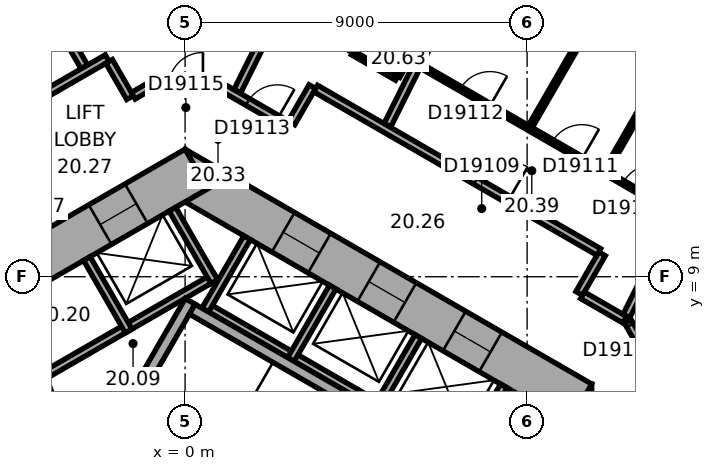
"""IFC4 building model, lengths in metres.
Left out: names, types, materials, properties, quantities, classifications, styles, units other than length and angle.
Written with IfcOpenShell. Run it as: python <this file> out.ifc"""

import sys

from ifc_helpers import new_model, si_unit, direction, frame, frame_2d, origin, place, context, subcontext, project, spatial, rectangle, extrude, element, fill, save


model = new_model("IFC4")
c1 = context("Model", 3, precision=1e-05, world=origin(), true_north=direction((0.0, 1.0)))
c2 = subcontext(c1, "Body", "Model", "MODEL_VIEW")
j1 = project(units=[si_unit("LENGTHUNIT", "METRE"), si_unit("PLANEANGLEUNIT", "RADIAN")], contexts=[c1])
p1 = place(None, origin())
s1 = spatial("IfcSite", under=j1, at=p1, CompositionType="ELEMENT")
p2 = place(p1, origin())
s2 = spatial("IfcBuilding", under=s1, at=p2, CompositionType="ELEMENT")
p3 = place(p2, frame((0.0, 0.0, 90.2)))
s3 = spatial("IfcBuildingStorey", under=s2, at=p3, CompositionType="ELEMENT", Elevation=90.2)
p4 = place(p3, frame((10.1, -6.177, 0.0), z_axis=(0.0, 0.0, 1.0), x_axis=(0.0, 1.0, 0.0)))
e1 = element("IfcWall", 1, at=p4, inside=s3, PredefinedType="SHEAR", context=c2, shape_type="SweptSolid", body=[
    extrude(rectangle(XDim=12.355, YDim=1.2, at=frame_2d((6.177, 0.0))), origin(), (0.0, 0.0, 1.0), 3.3),
])
p5 = place(p4, frame((6.378, 0.0, 0.0)))
e2 = element("IfcOpeningElement", 2, at=p5, cuts=e1, PredefinedType="OPENING", context=c2, shape_type="SweptSolid", body=[
    extrude(rectangle(XDim=1.5, YDim=2.1, at=frame_2d((0.75, 1.05))), frame((0.0, 0.61, 0.0), z_axis=(0.0, -1.0, 0.0), x_axis=(1.0, 0.0, 0.0)), (0.0, 0.0, 1.0), 1.22),
])
p6 = place(p4, frame((1.828, 0.0, 0.0)))
e3 = element("IfcOpeningElement", 3, at=p6, cuts=e1, PredefinedType="OPENING", context=c2, shape_type="SweptSolid", body=[
    extrude(rectangle(XDim=1.1, YDim=2.1, at=frame_2d((0.55, 1.05))), frame((0.0, 0.61, 0.0), z_axis=(0.0, -1.0, 0.0), x_axis=(1.0, 0.0, 0.0)), (0.0, 0.0, 1.0), 1.22),
])
p7 = place(p4, frame((4.427, 0.0, 0.0)))
e4 = element("IfcOpeningElement", 4, at=p7, cuts=e1, PredefinedType="OPENING", context=c2, shape_type="SweptSolid", body=[
    extrude(rectangle(XDim=1.1, YDim=2.1, at=frame_2d((0.55, 1.05))), frame((0.0, 0.61, 0.0), z_axis=(0.0, -1.0, 0.0), x_axis=(1.0, 0.0, 0.0)), (0.0, 0.0, 1.0), 1.22),
])
p8 = place(p3, frame((10.4, 5.658, 0.0), z_axis=(0.0, 0.0, 1.0), x_axis=(-0.866021384402, 0.500006961711, 0.0)))
e5 = element("IfcWall", 5, at=p8, inside=s3, PredefinedType="SHEAR", context=c2, shape_type="SweptSolid", body=[
    extrude(rectangle(XDim=12.355, YDim=1.2, at=frame_2d((6.178, 0.0))), origin(), (0.0, 0.0, 1.0), 3.3),
])
p9 = place(p8, frame((2.728, 0.0, 0.0)))
e6 = element("IfcOpeningElement", 6, at=p9, cuts=e5, PredefinedType="OPENING", context=c2, shape_type="SweptSolid", body=[
    extrude(rectangle(XDim=1.1, YDim=2.1, at=frame_2d((0.55, 1.05))), frame((0.0, 0.61, 0.0), z_axis=(0.0, -1.0, 0.0), x_axis=(1.0, 0.0, 0.0)), (0.0, 0.0, 1.0), 1.22),
])
p10 = place(p8, frame((5.328, 0.0, 0.0)))
e7 = element("IfcOpeningElement", 7, at=p10, cuts=e5, PredefinedType="OPENING", context=c2, shape_type="SweptSolid", body=[
    extrude(rectangle(XDim=1.1, YDim=2.1, at=frame_2d((0.55, 1.05))), frame((0.0, 0.61, 0.0), z_axis=(0.0, -1.0, 0.0), x_axis=(1.0, 0.0, 0.0)), (0.0, 0.0, 1.0), 1.22),
])
p11 = place(p8, frame((7.928, 0.0, 0.0)))
e8 = element("IfcOpeningElement", 8, at=p11, cuts=e5, PredefinedType="OPENING", context=c2, shape_type="SweptSolid", body=[
    extrude(rectangle(XDim=1.1, YDim=2.1, at=frame_2d((0.55, 1.05))), frame((0.0, 0.61, 0.0), z_axis=(0.0, -1.0, 0.0), x_axis=(1.0, 0.0, 0.0)), (0.0, 0.0, 1.0), 1.22),
])
p12 = place(p3, frame((0.3, 11.836, 0.0), z_axis=(0.0, 0.0, 1.0), x_axis=(-0.866021384402, -0.500006961711, 0.0)))
e9 = element("IfcWall", 9, at=p12, inside=s3, PredefinedType="SHEAR", context=c2, shape_type="SweptSolid", body=[
    extrude(rectangle(XDim=12.355, YDim=1.2, at=frame_2d((6.178, 0.0))), origin(), (0.0, 0.0, 1.0), 3.3),
])
p13 = place(p12, frame((6.378, 0.0, 0.0)))
e10 = element("IfcOpeningElement", 10, at=p13, cuts=e9, PredefinedType="OPENING", context=c2, shape_type="SweptSolid", body=[
    extrude(rectangle(XDim=1.5, YDim=2.1, at=frame_2d((0.75, 1.05))), frame((0.0, 0.61, 0.0), z_axis=(0.0, -1.0, 0.0), x_axis=(1.0, 0.0, 0.0)), (0.0, 0.0, 1.0), 1.22),
])
p14 = place(p12, frame((1.828, 0.0, 0.0)))
e11 = element("IfcOpeningElement", 11, at=p14, cuts=e9, PredefinedType="OPENING", context=c2, shape_type="SweptSolid", body=[
    extrude(rectangle(XDim=1.1, YDim=2.1, at=frame_2d((0.55, 1.05))), frame((0.0, 0.61, 0.0), z_axis=(0.0, -1.0, 0.0), x_axis=(1.0, 0.0, 0.0)), (0.0, 0.0, 1.0), 1.22),
])
p15 = place(p3, frame((-3.136, 24.805, 0.0), z_axis=(0.0, 0.0, 1.0), x_axis=(-0.866028291626, -0.499994998079, 0.0)))
e12 = element("IfcWall", 12, at=p15, inside=s3, PredefinedType="STANDARD", context=c2, shape_type="SweptSolid", body=[
    extrude(rectangle(XDim=21.246, YDim=0.2, at=frame_2d((10.623, 0.0))), origin(), (0.0, 0.0, 1.0), 3.3),
])
p16 = place(p15, frame((1.555, 0.0, 0.8)))
e13 = element("IfcOpeningElement", 13, at=p16, cuts=e12, PredefinedType="OPENING", context=c2, shape_type="SweptSolid", body=[
    extrude(rectangle(XDim=2.4, YDim=1.7, at=frame_2d((1.2, 0.85))), frame((0.0, 0.11, 0.0), z_axis=(0.0, -1.0, 0.0), x_axis=(1.0, 0.0, 0.0)), (0.0, 0.0, 1.0), 0.22),
])
p17 = place(p15, frame((5.489, 0.0, 0.8)))
e14 = element("IfcOpeningElement", 14, at=p17, cuts=e12, PredefinedType="OPENING", context=c2, shape_type="SweptSolid", body=[
    extrude(rectangle(XDim=2.4, YDim=1.7, at=frame_2d((1.2, 0.85))), frame((0.0, 0.11, 0.0), z_axis=(0.0, -1.0, 0.0), x_axis=(1.0, 0.0, 0.0)), (0.0, 0.0, 1.0), 0.22),
])
p18 = place(p15, frame((9.424, 0.0, 0.8)))
e15 = element("IfcOpeningElement", 15, at=p18, cuts=e12, PredefinedType="OPENING", context=c2, shape_type="SweptSolid", body=[
    extrude(rectangle(XDim=2.4, YDim=1.7, at=frame_2d((1.2, 0.85))), frame((0.0, 0.11, 0.0), z_axis=(0.0, -1.0, 0.0), x_axis=(1.0, 0.0, 0.0)), (0.0, 0.0, 1.0), 0.22),
])
p19 = place(p15, frame((13.358, 0.0, 0.8)))
e16 = element("IfcOpeningElement", 16, at=p19, cuts=e12, PredefinedType="OPENING", context=c2, shape_type="SweptSolid", body=[
    extrude(rectangle(XDim=2.4, YDim=1.7, at=frame_2d((1.2, 0.85))), frame((0.0, 0.11, 0.0), z_axis=(0.0, -1.0, 0.0), x_axis=(1.0, 0.0, 0.0)), (0.0, 0.0, 1.0), 0.22),
])
p20 = place(p15, frame((17.293, 0.0, 0.8)))
e17 = element("IfcOpeningElement", 17, at=p20, cuts=e12, PredefinedType="OPENING", context=c2, shape_type="SweptSolid", body=[
    extrude(rectangle(XDim=2.4, YDim=1.7, at=frame_2d((1.2, 0.85))), frame((0.0, 0.11, 0.0), z_axis=(0.0, -1.0, 0.0), x_axis=(1.0, 0.0, 0.0)), (0.0, 0.0, 1.0), 0.22),
])
p21 = place(p3, frame((7.424, 4.259, 0.0), z_axis=(0.0, 0.0, 1.0), x_axis=(-0.866026010844, 0.49999894854, 0.0)))
e18 = element("IfcWall", 18, at=p21, inside=s3, PredefinedType="PARTITIONING", context=c2, shape_type="SweptSolid", body=[
    extrude(rectangle(XDim=8.0, YDim=0.2, at=frame_2d((4.0, 0.0))), origin(), (0.0, 0.0, 1.0), 3.05),
])
for number, where, z_axis, x_axis in (
    (19, (7.287, 4.222, 0.0), (0.0, 0.0, 1.0), (0.5, 0.866, 0.0)),
    (20, (5.036, 5.522, 0.0), (0.0, 0.0, 1.0), (0.5, 0.866, 0.0)),
    (21, (2.784, 6.822, 0.0), (0.0, 0.0, 1.0), (0.5, 0.866, 0.0)),
    (22, (0.532, 8.122, 0.0), (0.0, 0.0, 1.0), (0.5, 0.866, 0.0)),
):
    element("IfcWall", number, at=place(p3, frame(where, z_axis=z_axis, x_axis=x_axis)), inside=s3, PredefinedType="PARTITIONING", context=c2, shape_type="SweptSolid", body=[
        extrude(rectangle(XDim=2.2, YDim=0.2, at=frame_2d((1.1, 0.0))), origin(), (0.0, 0.0, 1.0), 3.05),
    ])
p22 = place(p3, frame((0.803, 9.009, 0.0), z_axis=(0.0, 0.0, 1.0), x_axis=(-0.866028230842, -0.499995103361, 0.0)))
e23 = element("IfcWall", 23, at=p22, inside=s3, PredefinedType="PARTITIONING", context=c2, shape_type="SweptSolid", body=[
    extrude(rectangle(XDim=5.4, YDim=0.2, at=frame_2d((2.7, 0.0))), origin(), (0.0, 0.0, 1.0), 3.05),
])
p23 = place(p3, frame((0.767, 8.872, 0.0), z_axis=(0.0, 0.0, 1.0), x_axis=(-0.499994660107, 0.866028486751, 0.0)))
e24 = element("IfcWall", 24, at=p23, inside=s3, PredefinedType="PARTITIONING", context=c2, shape_type="SweptSolid", body=[
    extrude(rectangle(XDim=2.2, YDim=0.2, at=frame_2d((1.1, 0.0))), origin(), (0.0, 0.0, 1.0), 3.05),
])
p24 = place(p3, frame((-1.485, 7.572, 0.0), z_axis=(0.0, 0.0, 1.0), x_axis=(-0.50002983664, 0.866008176907, 0.0)))
e25 = element("IfcWall", 25, at=p24, inside=s3, PredefinedType="PARTITIONING", context=c2, shape_type="SweptSolid", body=[
    extrude(rectangle(XDim=2.2, YDim=0.2, at=frame_2d((1.1, 0.0))), origin(), (0.0, 0.0, 1.0), 3.05),
])
p25 = place(p3, frame((-2.216, 4.282, 0.0), z_axis=(0.0, 0.0, 1.0), x_axis=(0.499977259774, 0.866038532462, 0.0)))
e26 = element("IfcWall", 26, at=p25, inside=s3, PredefinedType="SHEAR", context=c2, shape_type="SweptSolid", body=[
    extrude(rectangle(XDim=4.7, YDim=0.3, at=frame_2d((2.35, 0.0))), origin(), (0.0, 0.0, 1.0), 3.05),
])
p26 = place(p3, frame((6.303, 4.617, 0.0), z_axis=(0.0, 0.0, 1.0), x_axis=(-0.866027801685, 0.499995846692, 0.0)))
e27 = element("IfcWall", 27, at=p26, inside=s3, PredefinedType="SHEAR", context=c2, shape_type="SweptSolid", body=[
    extrude(rectangle(XDim=7.06, YDim=0.3, at=frame_2d((3.53, 0.0))), origin(), (0.0, 0.0, 1.0), 3.05),
])
p27 = place(p3, frame((-2.615, 3.487, 0.0), z_axis=(0.0, 0.0, 1.0), x_axis=(-0.373576831041, 0.92759924068, 0.0)))
e28 = element("IfcWall", 28, at=p27, inside=s3, PredefinedType="PARTITIONING", context=c2, shape_type="SweptSolid", body=[
    extrude(rectangle(XDim=3.002, YDim=0.2, at=frame_2d((1.501, 0.0))), origin(), (0.0, 0.0, 1.0), 3.05),
])
p28 = place(p27, frame((1.15, 0.0, 0.0)))
e29 = element("IfcOpeningElement", 29, at=p28, cuts=e28, PredefinedType="OPENING", context=c2, shape_type="SweptSolid", body=[
    extrude(rectangle(XDim=0.9, YDim=2.1, at=frame_2d((0.45, 1.05))), frame((0.0, 0.11, 0.0), z_axis=(0.0, -1.0, 0.0), x_axis=(1.0, 0.0, 0.0)), (0.0, 0.0, 1.0), 0.22),
])
p29 = place(p3, frame((-6.676, 21.492, 0.0), z_axis=(0.0, 0.0, 1.0), x_axis=(0.500011263043, -0.866018900966, 0.0)))
e30 = element("IfcWall", 30, at=p29, inside=s3, PredefinedType="PARTITIONING", context=c2, shape_type="SweptSolid", body=[
    extrude(rectangle(XDim=8.049, YDim=0.2, at=frame_2d((4.024, 0.0))), origin(), (0.0, 0.0, 1.0), 3.05),
])
p30 = place(p3, frame((-2.05, 14.752, 0.0), z_axis=(0.0, 0.0, 1.0), x_axis=(-0.866030936828, -0.499990416364, 0.0)))
e31 = element("IfcWall", 31, at=p30, inside=s3, PredefinedType="PARTITIONING", context=c2, shape_type="SweptSolid", body=[
    extrude(rectangle(XDim=3.102, YDim=0.2, at=frame_2d((1.551, 0.0))), origin(), (0.0, 0.0, 1.0), 3.05),
])
p31 = place(p3, frame((-1.449, 13.712, 0.0), z_axis=(0.0, 0.0, 1.0), x_axis=(-0.499978356969, 0.866037899034, 0.0)))
e32 = element("IfcWall", 32, at=p31, inside=s3, PredefinedType="PARTITIONING", context=c2, shape_type="SweptSolid", body=[
    extrude(rectangle(XDim=1.101, YDim=0.2, at=frame_2d((0.551, 0.0))), origin(), (0.0, 0.0, 1.0), 3.05),
])
p32 = place(p3, frame((-0.95, 14.001, 0.0), z_axis=(0.0, 0.0, 1.0), x_axis=(-0.86609177584, -0.499885022602, 0.0)))
e33 = element("IfcWall", 33, at=p32, inside=s3, PredefinedType="PARTITIONING", context=c2, shape_type="SweptSolid", body=[
    extrude(rectangle(XDim=0.477, YDim=0.2, at=frame_2d((0.238, 0.0))), origin(), (0.0, 0.0, 1.0), 3.05),
])
p33 = place(p3, frame((0.95, 14.001, 0.0), z_axis=(0.0, 0.0, 1.0), x_axis=(-1.0, 0.0, 0.0)))
e34 = element("IfcWall", 34, at=p33, inside=s3, PredefinedType="PARTITIONING", context=c2, shape_type="SweptSolid", body=[
    extrude(rectangle(XDim=1.86, YDim=0.2, at=frame_2d((0.93, 0.0))), origin(), (0.0, 0.0, 1.0), 3.05),
])
p34 = place(p33, frame((0.48, 0.0, 0.0)))
e35 = element("IfcOpeningElement", 35, at=p34, cuts=e34, PredefinedType="OPENING", context=c2, shape_type="SweptSolid", body=[
    extrude(rectangle(XDim=0.9, YDim=2.1, at=frame_2d((0.45, 1.05))), frame((0.0, 0.11, 0.0), z_axis=(0.0, -1.0, 0.0), x_axis=(1.0, 0.0, 0.0)), (0.0, 0.0, 1.0), 0.22),
])
p35 = place(p3, frame((2.748, 12.962, 0.0), z_axis=(0.0, 0.0, 1.0), x_axis=(-0.866013897511, 0.50001992892, 0.0)))
e36 = element("IfcWall", 36, at=p35, inside=s3, PredefinedType="PARTITIONING", context=c2, shape_type="SweptSolid", body=[
    extrude(rectangle(XDim=2.037, YDim=0.2, at=frame_2d((1.018, 0.0))), origin(), (0.0, 0.0, 1.0), 3.05),
])
p36 = place(p35, frame((0.372, 0.0, 0.0)))
e37 = element("IfcOpeningElement", 37, at=p36, cuts=e36, PredefinedType="OPENING", context=c2, shape_type="SweptSolid", body=[
    extrude(rectangle(XDim=0.9, YDim=2.1, at=frame_2d((0.45, 1.05))), frame((0.0, 0.11, 0.0), z_axis=(0.0, -1.0, 0.0), x_axis=(1.0, 0.0, 0.0)), (0.0, 0.0, 1.0), 0.22),
])
p37 = place(p3, frame((3.349, 14.002, 0.0), z_axis=(0.0, 0.0, 1.0), x_axis=(-0.500074377092, -0.865982457891, 0.0)))
e38 = element("IfcWall", 38, at=p37, inside=s3, PredefinedType="PARTITIONING", context=c2, shape_type="SweptSolid", body=[
    extrude(rectangle(XDim=1.101, YDim=0.2, at=frame_2d((0.55, 0.0))), origin(), (0.0, 0.0, 1.0), 3.05),
])
p38 = place(p3, frame((4.356, 14.922, 0.0), z_axis=(0.0, 0.0, 1.0), x_axis=(0.499936506574, 0.866062058628, 0.0)))
e39 = element("IfcWall", 39, at=p38, inside=s3, PredefinedType="PARTITIONING", context=c2, shape_type="SweptSolid", body=[
    extrude(rectangle(XDim=2.6, YDim=0.12, at=frame_2d((1.3, 0.0))), origin(), (0.0, 0.0, 1.0), 3.05),
])
p39 = place(p38, frame((0.85, 0.0, 0.0)))
e40 = element("IfcOpeningElement", 40, at=p39, cuts=e39, PredefinedType="OPENING", context=c2, shape_type="SweptSolid", body=[
    extrude(rectangle(XDim=0.9, YDim=2.1, at=frame_2d((0.45, 1.05))), frame((0.0, 0.07, 0.0), z_axis=(0.0, -1.0, 0.0), x_axis=(1.0, 0.0, 0.0)), (0.0, 0.0, 1.0), 0.14),
])
p40 = place(p3, frame((5.351, 21.859, 0.0), z_axis=(0.0, 0.0, 1.0), x_axis=(-0.446205309328, -0.894930624086, 0.0)))
e41 = element("IfcWall", 41, at=p40, inside=s3, PredefinedType="PARTITIONING", context=c2, shape_type="SweptSolid", body=[
    extrude(rectangle(XDim=8.913, YDim=0.2, at=frame_2d((4.457, 0.0))), origin(), (0.0, 0.0, 1.0), 2.6),
])
p41 = place(p3, frame((5.569, 14.222, 0.0), z_axis=(0.0, 0.0, 1.0), x_axis=(-0.866036909293, 0.499980071345, 0.0)))
e42 = element("IfcWall", 42, at=p41, inside=s3, PredefinedType="PARTITIONING", context=c2, shape_type="SweptSolid", body=[
    extrude(rectangle(XDim=1.34, YDim=0.12, at=frame_2d((0.67, 0.0))), origin(), (0.0, 0.0, 1.0), 3.05),
])
p42 = place(p3, frame((6.839, 16.422, 0.0), z_axis=(0.0, 0.0, 1.0), x_axis=(-0.50000366821, -0.866023285932, 0.0)))
e43 = element("IfcWall", 43, at=p42, inside=s3, PredefinedType="PARTITIONING", context=c2, shape_type="SweptSolid", body=[
    extrude(rectangle(XDim=2.48, YDim=0.12, at=frame_2d((1.24, 0.0))), origin(), (0.0, 0.0, 1.0), 3.05),
])
p43 = place(p3, frame((8.872, 20.104, 0.0), z_axis=(0.0, 0.0, 1.0), x_axis=(-0.446218378653, -0.894924107706, 0.0)))
e44 = element("IfcWall", 44, at=p43, inside=s3, PredefinedType="PARTITIONING", context=c2, shape_type="SweptSolid", body=[
    extrude(rectangle(XDim=7.95, YDim=0.2, at=frame_2d((3.975, 0.0))), origin(), (0.0, 0.0, 1.0), 3.05),
])
p44 = place(p3, frame((10.371, 8.561, 0.0), z_axis=(0.0, 0.0, 1.0), x_axis=(0.499986357472, 0.866033280158, 0.0)))
e45 = element("IfcWall", 45, at=p44, inside=s3, PredefinedType="PARTITIONING", context=c2, shape_type="SweptSolid", body=[
    extrude(rectangle(XDim=1.201, YDim=0.2, at=frame_2d((0.601, 0.0))), origin(), (0.0, 0.0, 1.0), 3.05),
])
p45 = place(p3, frame((10.885, 9.652, 0.0), z_axis=(0.0, 0.0, 1.0), x_axis=(-0.866033868542, 0.499985338323, 0.0)))
e46 = element("IfcWall", 46, at=p45, inside=s3, PredefinedType="PARTITIONING", context=c2, shape_type="SweptSolid", body=[
    extrude(rectangle(XDim=8.602, YDim=0.2, at=frame_2d((4.301, 0.0))), origin(), (0.0, 0.0, 1.0), 3.05),
])
p46 = place(p45, frame((2.739, 0.0, 0.0)))
e47 = element("IfcOpeningElement", 47, at=p46, cuts=e46, PredefinedType="OPENING", context=c2, shape_type="SweptSolid", body=[
    extrude(rectangle(XDim=1.0, YDim=2.1, at=frame_2d((0.5, 1.05))), frame((0.0, 0.11, 0.0), z_axis=(0.0, -1.0, 0.0), x_axis=(1.0, 0.0, 0.0)), (0.0, 0.0, 1.0), 0.22),
])
p47 = place(p3, frame((11.566, 7.871, 0.0), z_axis=(0.0, 0.0, 1.0), x_axis=(-0.866004557827, 0.500036104519, 0.0)))
e48 = element("IfcWall", 48, at=p47, inside=s3, PredefinedType="PARTITIONING", context=c2, shape_type="SweptSolid", body=[
    extrude(rectangle(XDim=1.28, YDim=0.2, at=frame_2d((0.64, 0.0))), origin(), (0.0, 0.0, 1.0), 3.05),
])
p48 = place(p3, frame((12.243, 18.423, 0.0), z_axis=(0.0, 0.0, 1.0), x_axis=(-0.499993523031, -0.866029143232, 0.0)))
e49 = element("IfcWall", 49, at=p48, inside=s3, PredefinedType="PARTITIONING", context=c2, shape_type="SweptSolid", body=[
    extrude(rectangle(XDim=6.315, YDim=0.12, at=frame_2d((3.157, 0.0))), origin(), (0.0, 0.0, 1.0), 2.6),
])
p49 = place(p3, frame((12.448, 14.177, 0.0), z_axis=(0.0, 0.0, 1.0), x_axis=(-0.500048966069, -0.865997131366, 0.0)))
e50 = element("IfcWall", 50, at=p49, inside=s3, PredefinedType="PARTITIONING", context=c2, shape_type="SweptSolid", body=[
    extrude(rectangle(XDim=2.74, YDim=0.12, at=frame_2d((1.37, 0.0))), origin(), (0.0, 0.0, 1.0), 3.05),
])
p50 = place(p3, frame((12.58, 6.212, 0.0), z_axis=(0.0, 0.0, 1.0), x_axis=(-0.500063286585, 0.865988862174, 0.0)))
e51 = element("IfcWall", 51, at=p50, inside=s3, PredefinedType="PARTITIONING", context=c2, shape_type="SweptSolid", body=[
    extrude(rectangle(XDim=1.86, YDim=0.2, at=frame_2d((0.93, 0.0))), origin(), (0.0, 0.0, 1.0), 3.05),
])
p51 = place(p50, frame((0.842, 0.0, 0.0)))
e52 = element("IfcOpeningElement", 52, at=p51, cuts=e51, PredefinedType="OPENING", context=c2, shape_type="SweptSolid", body=[
    extrude(rectangle(XDim=0.9, YDim=2.1, at=frame_2d((0.45, 1.05))), frame((0.0, 0.11, 0.0), z_axis=(0.0, -1.0, 0.0), x_axis=(1.0, 0.0, 0.0)), (0.0, 0.0, 1.0), 0.22),
])
p52 = place(p3, frame((12.866, 10.702, 0.0), z_axis=(0.0, 0.0, 1.0), x_axis=(-0.866023151433, 0.500003901167, 0.0)))
e53 = element("IfcWall", 53, at=p52, inside=s3, PredefinedType="PARTITIONING", context=c2, shape_type="SweptSolid", body=[
    extrude(rectangle(XDim=7.684, YDim=0.12, at=frame_2d((3.842, 0.0))), origin(), (0.0, 0.0, 1.0), 3.05),
])
p53 = place(p52, frame((0.55, 0.0, 0.0)))
e54 = element("IfcOpeningElement", 54, at=p53, cuts=e53, PredefinedType="OPENING", context=c2, shape_type="SweptSolid", body=[
    extrude(rectangle(XDim=1.0, YDim=2.1, at=frame_2d((0.5, 1.05))), frame((0.0, 0.07, 0.0), z_axis=(0.0, -1.0, 0.0), x_axis=(1.0, 0.0, 0.0)), (0.0, 0.0, 1.0), 0.14),
])
p54 = place(p52, frame((2.8, 0.0, 0.0)))
e55 = element("IfcOpeningElement", 55, at=p54, cuts=e53, PredefinedType="OPENING", context=c2, shape_type="SweptSolid", body=[
    extrude(rectangle(XDim=0.9, YDim=2.1, at=frame_2d((0.45, 1.05))), frame((0.0, 0.07, 0.0), z_axis=(0.0, -1.0, 0.0), x_axis=(1.0, 0.0, 0.0)), (0.0, 0.0, 1.0), 0.14),
])
p55 = place(p52, frame((5.592, 0.0, 0.0)))
e56 = element("IfcOpeningElement", 56, at=p55, cuts=e53, PredefinedType="OPENING", context=c2, shape_type="SweptSolid", body=[
    extrude(rectangle(XDim=0.9, YDim=2.1, at=frame_2d((0.45, 1.05))), frame((0.0, 0.07, 0.0), z_axis=(0.0, -1.0, 0.0), x_axis=(1.0, 0.0, 0.0)), (0.0, 0.0, 1.0), 0.14),
])
p56 = place(p3, frame((15.915, 16.592, 0.0), z_axis=(0.0, 0.0, 1.0), x_axis=(-0.446199736347, -0.894933402709, 0.0)))
e57 = element("IfcWall", 57, at=p56, inside=s3, PredefinedType="PARTITIONING", context=c2, shape_type="SweptSolid", body=[
    extrude(rectangle(XDim=9.635, YDim=0.2, at=frame_2d((4.817, 0.0))), origin(), (0.0, 0.0, 1.0), 3.05),
])
p57 = place(p9, origin())
e58 = element("IfcDoor", 58, at=p57, inside=s3, OperationType="DOUBLE_DOOR_SLIDING", PredefinedType="DOOR", context=c2, shape_type="SweptSolid", body=[
    extrude(rectangle(XDim=1.1, YDim=2.1, at=frame_2d((0.55, 1.05))), frame((0.0, 0.025, 0.0), z_axis=(0.0, -1.0, 0.0), x_axis=(1.0, 0.0, 0.0)), (0.0, 0.0, 1.0), 0.05),
])
fill(e6, e58)
p58 = place(p10, origin())
e59 = element("IfcDoor", 59, at=p58, inside=s3, OperationType="DOUBLE_DOOR_SLIDING", PredefinedType="DOOR", context=c2, shape_type="SweptSolid", body=[
    extrude(rectangle(XDim=1.1, YDim=2.1, at=frame_2d((0.55, 1.05))), frame((0.0, 0.025, 0.0), z_axis=(0.0, -1.0, 0.0), x_axis=(1.0, 0.0, 0.0)), (0.0, 0.0, 1.0), 0.05),
])
fill(e7, e59)
p59 = place(p11, origin())
e60 = element("IfcDoor", 60, at=p59, inside=s3, OperationType="DOUBLE_DOOR_SLIDING", PredefinedType="DOOR", context=c2, shape_type="SweptSolid", body=[
    extrude(rectangle(XDim=1.1, YDim=2.1, at=frame_2d((0.55, 1.05))), frame((0.0, 0.025, 0.0), z_axis=(0.0, -1.0, 0.0), x_axis=(1.0, 0.0, 0.0)), (0.0, 0.0, 1.0), 0.05),
])
fill(e8, e60)
p60 = place(p14, origin())
e61 = element("IfcDoor", 61, at=p60, inside=s3, OperationType="DOUBLE_DOOR_SLIDING", PredefinedType="DOOR", context=c2, shape_type="SweptSolid", body=[
    extrude(rectangle(XDim=1.1, YDim=2.1, at=frame_2d((0.55, 1.05))), frame((0.0, 0.025, 0.0), z_axis=(0.0, -1.0, 0.0), x_axis=(1.0, 0.0, 0.0)), (0.0, 0.0, 1.0), 0.05),
])
fill(e11, e61)
p61 = place(p51, origin())
e62 = element("IfcDoor", 62, at=p61, inside=s3, OperationType="SINGLE_SWING_LEFT", PredefinedType="DOOR", context=c2, shape_type="SweptSolid", body=[
    extrude(rectangle(XDim=0.9, YDim=2.1, at=frame_2d((0.45, 1.05))), frame((0.0, 0.025, 0.0), z_axis=(0.0, -1.0, 0.0), x_axis=(1.0, 0.0, 0.0)), (0.0, 0.0, 1.0), 0.05),
])
fill(e52, e62)
p62 = place(p46, origin())
e63 = element("IfcDoor", 63, at=p62, inside=s3, OperationType="SINGLE_SWING_LEFT", PredefinedType="DOOR", context=c2, shape_type="SweptSolid", body=[
    extrude(rectangle(XDim=1.0, YDim=2.1, at=frame_2d((0.5, 1.05))), frame((0.0, 0.025, 0.0), z_axis=(0.0, -1.0, 0.0), x_axis=(1.0, 0.0, 0.0)), (0.0, 0.0, 1.0), 0.05),
])
fill(e47, e63)
p63 = place(p53, origin())
e64 = element("IfcDoor", 64, at=p63, inside=s3, OperationType="SINGLE_SWING_LEFT", PredefinedType="DOOR", context=c2, shape_type="SweptSolid", body=[
    extrude(rectangle(XDim=1.0, YDim=2.1, at=frame_2d((0.5, 1.05))), frame((0.0, 0.025, 0.0), z_axis=(0.0, -1.0, 0.0), x_axis=(1.0, 0.0, 0.0)), (0.0, 0.0, 1.0), 0.05),
])
fill(e54, e64)
p64 = place(p54, origin())
e65 = element("IfcDoor", 65, at=p64, inside=s3, OperationType="SINGLE_SWING_LEFT", PredefinedType="DOOR", context=c2, shape_type="SweptSolid", body=[
    extrude(rectangle(XDim=0.9, YDim=2.1, at=frame_2d((0.45, 1.05))), frame((0.0, 0.025, 0.0), z_axis=(0.0, -1.0, 0.0), x_axis=(1.0, 0.0, 0.0)), (0.0, 0.0, 1.0), 0.05),
])
fill(e55, e65)
p65 = place(p55, origin())
e66 = element("IfcDoor", 66, at=p65, inside=s3, OperationType="SINGLE_SWING_LEFT", PredefinedType="DOOR", context=c2, shape_type="SweptSolid", body=[
    extrude(rectangle(XDim=0.9, YDim=2.1, at=frame_2d((0.45, 1.05))), frame((0.0, 0.025, 0.0), z_axis=(0.0, -1.0, 0.0), x_axis=(1.0, 0.0, 0.0)), (0.0, 0.0, 1.0), 0.05),
])
fill(e56, e66)
p66 = place(p36, origin())
e67 = element("IfcDoor", 67, at=p66, inside=s3, OperationType="SINGLE_SWING_LEFT", PredefinedType="DOOR", context=c2, shape_type="SweptSolid", body=[
    extrude(rectangle(XDim=0.9, YDim=2.1, at=frame_2d((0.45, 1.05))), frame((0.0, 0.025, 0.0), z_axis=(0.0, -1.0, 0.0), x_axis=(1.0, 0.0, 0.0)), (0.0, 0.0, 1.0), 0.05),
])
fill(e37, e67)
p67 = place(p34, origin())
e68 = element("IfcDoor", 68, at=p67, inside=s3, OperationType="SINGLE_SWING_LEFT", PredefinedType="DOOR", context=c2, shape_type="SweptSolid", body=[
    extrude(rectangle(XDim=0.9, YDim=2.1, at=frame_2d((0.45, 1.05))), frame((0.0, 0.025, 0.0), z_axis=(0.0, -1.0, 0.0), x_axis=(1.0, 0.0, 0.0)), (0.0, 0.0, 1.0), 0.05),
])
fill(e35, e68)
save(model, sys.argv[1])
